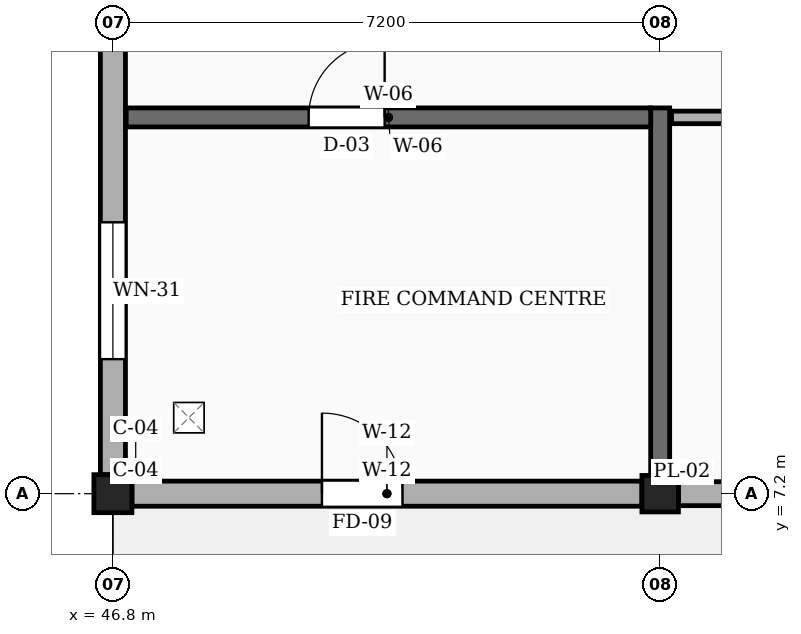
"""IFC4 building model, lengths in metres.
Left out: names, types, materials, properties, quantities, classifications, styles, units other than length and angle.
Written with IfcOpenShell. Run it as: python <this file> out.ifc"""

import sys

from ifc_helpers import new_model, si_unit, direction, frame, frame_2d, origin, origin_2d, place, context, subcontext, project, spatial, rectangle, extrude, element, fill, save


model = new_model("IFC4")
c1 = context("Model", 3, precision=1e-05, world=origin(), true_north=direction((0.0, 1.0)))
c2 = subcontext(c1, "Body", "Model", "MODEL_VIEW")
j1 = project(units=[si_unit("LENGTHUNIT", "METRE"), si_unit("PLANEANGLEUNIT", "RADIAN")], contexts=[c1])
p1 = place(None, origin())
s1 = spatial("IfcSite", under=j1, at=p1, CompositionType="ELEMENT")
p2 = place(p1, origin())
s2 = spatial("IfcBuilding", under=s1, at=p2, CompositionType="ELEMENT")
p3 = place(p2, origin())
s3 = spatial("IfcBuildingStorey", under=s2, at=p3, CompositionType="ELEMENT", Elevation=0.0)
p4 = place(p3, frame((46.8, 7.2, 0.0), z_axis=(0.0, 0.0, 1.0), x_axis=(1.0, 0.0, 0.0)))
e1 = element("IfcColumn", 1, at=p4, inside=s3, PredefinedType="COLUMN", context=c2, shape_type="SweptSolid", body=[
    extrude(rectangle(XDim=0.5, YDim=0.5, at=origin_2d()), origin(), (0.0, 0.0, 1.0), 4.5),
])
p5 = place(p3, frame((54.0, 7.2, 0.0), z_axis=(0.0, 0.0, 1.0), x_axis=(1.0, 0.0, 0.0)))
e2 = element("IfcColumn", 2, at=p5, inside=s3, PredefinedType="PILASTER", context=c2, shape_type="SweptSolid", body=[
    extrude(rectangle(XDim=0.48, YDim=0.48, at=origin_2d()), origin(), (0.0, 0.0, 1.0), 4.5),
])
p6 = place(p3, frame((47.05, 7.2, 0.0), z_axis=(0.0, 0.0, 1.0), x_axis=(1.0, 0.0, 0.0)))
e3 = element("IfcWall", 3, at=p6, inside=s3, PredefinedType="SOLIDWALL", context=c2, shape_type="SweptSolid", body=[
    extrude(rectangle(XDim=6.71, YDim=0.33, at=frame_2d((3.355, 0.0))), origin(), (0.0, 0.0, 1.0), 3.83),
])
p7 = place(p6, frame((2.5, 0.0, 0.0)))
e4 = element("IfcOpeningElement", 4, at=p7, cuts=e3, PredefinedType="OPENING", context=c2, shape_type="SweptSolid", body=[
    extrude(rectangle(XDim=1.06, YDim=2.15, at=frame_2d((0.53, 1.075))), frame((0.0, 0.175, 0.0), z_axis=(0.0, -1.0, 0.0), x_axis=(1.0, 0.0, 0.0)), (0.0, 0.0, 1.0), 0.35),
])
p8 = place(p3, frame((54.24, 7.2, 0.0), z_axis=(0.0, 0.0, 1.0), x_axis=(1.0, 0.0, 0.0)))
e5 = element("IfcWall", 5, at=p8, inside=s3, PredefinedType="SOLIDWALL", context=c2, shape_type="SweptSolid", body=[
    extrude(rectangle(XDim=6.71, YDim=0.315, at=frame_2d((3.355, 0.0))), origin(), (0.0, 0.0, 1.0), 3.83),
])
p9 = place(p8, frame((2.405, 0.0, 0.0)))
e6 = element("IfcOpeningElement", 6, at=p9, cuts=e5, PredefinedType="OPENING", context=c2, shape_type="SweptSolid", body=[
    extrude(rectangle(XDim=1.9, YDim=2.2, at=frame_2d((0.95, 1.1))), frame((0.0, 0.167, 0.0), z_axis=(0.0, -1.0, 0.0), x_axis=(1.0, 0.0, 0.0)), (0.0, 0.0, 1.0), 0.335),
])
p10 = place(p3, frame((46.8, 14.16, 0.0), z_axis=(0.0, 0.0, 1.0), x_axis=(0.0, -1.0, 0.0)))
e7 = element("IfcWall", 7, at=p10, inside=s3, PredefinedType="SOLIDWALL", context=c2, shape_type="SweptSolid", body=[
    extrude(rectangle(XDim=6.71, YDim=0.33, at=frame_2d((3.355, 0.0))), origin(), (0.0, 0.0, 1.0), 3.83),
])
p11 = place(p10, frame((3.39, 0.0, 0.85)))
e8 = element("IfcOpeningElement", 8, at=p11, cuts=e7, PredefinedType="OPENING", context=c2, shape_type="SweptSolid", body=[
    extrude(rectangle(XDim=1.8, YDim=2.1, at=frame_2d((0.9, 1.05))), frame((0.0, 0.175, 0.0), z_axis=(0.0, -1.0, 0.0), x_axis=(1.0, 0.0, 0.0)), (0.0, 0.0, 1.0), 0.35),
])
p12 = place(p3, frame((54.0, 7.45, 0.0), z_axis=(0.0, 0.0, 1.0), x_axis=(0.0, 1.0, 0.0)))
e9 = element("IfcWall", 9, at=p12, inside=s3, PredefinedType="SHEAR", context=c2, shape_type="SweptSolid", body=[
    extrude(rectangle(XDim=4.825, YDim=0.25, at=frame_2d((2.413, 0.0))), origin(), (0.0, 0.0, 1.0), 3.41),
])
p13 = place(p3, frame((46.975, 12.15, 0.0), z_axis=(0.0, 0.0, 1.0), x_axis=(1.0, 0.0, 0.0)))
e10 = element("IfcWall", 10, at=p13, inside=s3, PredefinedType="SHEAR", context=c2, shape_type="SweptSolid", body=[
    extrude(rectangle(XDim=6.9, YDim=0.25, at=frame_2d((3.45, 0.0))), origin(), (0.0, 0.0, 1.0), 3.41),
])
p14 = place(p13, frame((2.4, 0.0, 0.0)))
e11 = element("IfcOpeningElement", 11, at=p14, cuts=e10, PredefinedType="OPENING", context=c2, shape_type="SweptSolid", body=[
    extrude(rectangle(XDim=1.0, YDim=2.15, at=frame_2d((0.5, 1.075))), frame((0.0, 0.135, 0.0), z_axis=(0.0, -1.0, 0.0), x_axis=(1.0, 0.0, 0.0)), (0.0, 0.0, 1.0), 0.27),
])
p15 = place(p3, frame((54.15, 12.15, 0.0), z_axis=(0.0, 0.0, 1.0), x_axis=(1.0, 0.0, 0.0)))
e12 = element("IfcWall", 12, at=p15, inside=s3, PredefinedType="PARTITIONING", context=c2, shape_type="SweptSolid", body=[
    extrude(rectangle(XDim=6.97, YDim=0.165, at=frame_2d((3.485, 0.0))), origin(), (0.0, 0.0, 1.0), 3.41),
])
p16 = place(p15, frame((2.4, 0.0, 0.0)))
e13 = element("IfcOpeningElement", 13, at=p16, cuts=e12, PredefinedType="OPENING", context=c2, shape_type="SweptSolid", body=[
    extrude(rectangle(XDim=1.12, YDim=2.18, at=frame_2d((0.56, 1.09))), frame((0.0, 0.093, 0.0), z_axis=(0.0, -1.0, 0.0), x_axis=(1.0, 0.0, 0.0)), (0.0, 0.0, 1.0), 0.185),
])
p17 = place(p7, frame((1.06, 0.0, 0.0), z_axis=(0.0, 0.0, 1.0), x_axis=(-1.0, 0.0, 0.0)))
e14 = element("IfcDoor", 14, at=p17, inside=s3, OperationType="SINGLE_SWING_LEFT", PredefinedType="DOOR", context=c2, shape_type="SweptSolid", body=[
    extrude(rectangle(XDim=1.06, YDim=2.15, at=frame_2d((0.53, 1.075))), frame((0.0, 0.025, 0.0), z_axis=(0.0, -1.0, 0.0), x_axis=(1.0, 0.0, 0.0)), (0.0, 0.0, 1.0), 0.05),
])
fill(e4, e14)
p18 = place(p11, origin())
e15 = element("IfcWindow", 15, at=p18, inside=s3, PartitioningType="SINGLE_PANEL", PredefinedType="WINDOW", context=c2, shape_type="SweptSolid", body=[
    extrude(rectangle(XDim=1.8, YDim=2.1, at=frame_2d((0.9, 1.05))), frame((0.0, 0.03, 0.0), z_axis=(0.0, -1.0, 0.0), x_axis=(1.0, 0.0, 0.0)), (0.0, 0.0, 1.0), 0.06),
])
fill(e8, e15)
p19 = place(p14, origin())
e16 = element("IfcDoor", 16, at=p19, inside=s3, OperationType="SINGLE_SWING_RIGHT", PredefinedType="DOOR", context=c2, shape_type="SweptSolid", body=[
    extrude(rectangle(XDim=1.0, YDim=2.15, at=frame_2d((0.5, 1.075))), frame((0.0, 0.025, 0.0), z_axis=(0.0, -1.0, 0.0), x_axis=(1.0, 0.0, 0.0)), (0.0, 0.0, 1.0), 0.05),
])
fill(e11, e16)
save(model, sys.argv[1])
